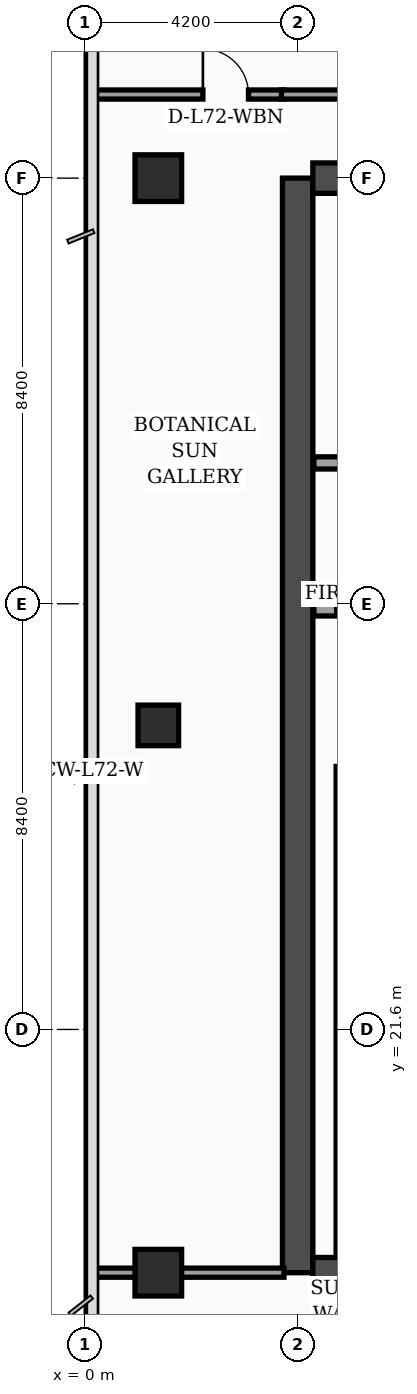
"""IFC4 building model, lengths in metres.
Left out: names, types, materials, properties, quantities, classifications, styles, units other than length and angle.
Written with IfcOpenShell. Run it as: python <this file> out.ifc"""

import sys

from ifc_helpers import new_model, si_unit, direction, frame, frame_2d, origin, origin_2d, place, context, subcontext, project, spatial, rectangle, extrude, element, fill, save


model = new_model("IFC4")
c1 = context("Model", 3, precision=1e-05, world=origin(), true_north=direction((0.0, 1.0)))
c2 = subcontext(c1, "Body", "Model", "MODEL_VIEW")
j1 = project(units=[si_unit("LENGTHUNIT", "METRE"), si_unit("PLANEANGLEUNIT", "RADIAN")], contexts=[c1])
p1 = place(None, origin())
s1 = spatial("IfcSite", under=j1, at=p1, CompositionType="ELEMENT")
p2 = place(p1, origin())
s2 = spatial("IfcBuilding", under=s1, at=p2, CompositionType="ELEMENT")
p3 = place(p2, frame((0.0, 0.0, 291.1)))
s3 = spatial("IfcBuildingStorey", under=s2, at=p3, CompositionType="ELEMENT", Elevation=291.1)
p4 = place(p3, frame((4.2, 16.8, 0.0), z_axis=(0.0, 0.0, 1.0), x_axis=(0.0, 1.0, 0.0)))
e1 = element("IfcWall", 1, at=p4, inside=s3, PredefinedType="SHEAR", context=c2, shape_type="SweptSolid", body=[
    extrude(rectangle(XDim=21.6, YDim=0.6, at=frame_2d((10.8, 0.0))), origin(), (0.0, 0.0, 1.0), 3.56),
])
p5 = place(p3, frame((4.5, 38.4, 0.0), z_axis=(0.0, 0.0, 1.0), x_axis=(1.0, 0.0, 0.0)))
e2 = element("IfcWall", 2, at=p5, inside=s3, PredefinedType="SHEAR", context=c2, shape_type="SweptSolid", body=[
    extrude(rectangle(XDim=10.2, YDim=0.6, at=frame_2d((5.1, 0.0))), origin(), (0.0, 0.0, 1.0), 3.56),
])
p6 = place(p5, frame((5.8, 0.0, 0.0)))
e3 = element("IfcOpeningElement", 3, at=p6, cuts=e2, PredefinedType="OPENING", context=c2, shape_type="SweptSolid", body=[
    extrude(rectangle(XDim=1.1, YDim=2.2, at=frame_2d((0.55, 1.1))), frame((0.0, 0.31, 0.0), z_axis=(0.0, -1.0, 0.0), x_axis=(1.0, 0.0, 0.0)), (0.0, 0.0, 1.0), 0.62),
])
p7 = place(p3, frame((4.5, 16.8, 0.0), z_axis=(0.0, 0.0, 1.0), x_axis=(1.0, 0.0, 0.0)))
e4 = element("IfcWall", 4, at=p7, inside=s3, PredefinedType="SHEAR", context=c2, shape_type="SweptSolid", body=[
    extrude(rectangle(XDim=10.2, YDim=0.6, at=frame_2d((5.1, 0.0))), origin(), (0.0, 0.0, 1.0), 3.56),
])
p8 = place(p3, frame((5.08, 17.1, 0.0), z_axis=(0.0, 0.0, 1.0), x_axis=(0.0, 1.0, 0.0)))
e5 = element("IfcWall", 5, at=p8, inside=s3, PredefinedType="SOLIDWALL", context=c2, shape_type="SweptSolid", body=[
    extrude(rectangle(XDim=9.69, YDim=0.24, at=frame_2d((4.845, 0.0))), origin(), (0.0, 0.0, 1.0), 3.56),
])
p9 = place(p3, frame((1.45, 16.8, 0.0), z_axis=(0.0, 0.0, 1.0), x_axis=(1.0, 0.0, 0.0)))
e6 = element("IfcColumn", 6, at=p9, inside=s3, PredefinedType="COLUMN", context=c2, shape_type="SweptSolid", body=[
    extrude(rectangle(XDim=0.92, YDim=0.92, at=origin_2d()), origin(), (0.0, 0.0, 1.0), 3.56),
])
p10 = place(p3, frame((1.45, 27.6, 0.0), z_axis=(0.0, 0.0, 1.0), x_axis=(1.0, 0.0, 0.0)))
e7 = element("IfcColumn", 7, at=p10, inside=s3, PredefinedType="COLUMN", context=c2, shape_type="SweptSolid", body=[
    extrude(rectangle(XDim=0.8, YDim=0.8, at=origin_2d()), origin(), (0.0, 0.0, 1.0), 3.56),
])
p11 = place(p3, frame((1.45, 38.4, 0.0), z_axis=(0.0, 0.0, 1.0), x_axis=(1.0, 0.0, 0.0)))
e8 = element("IfcColumn", 8, at=p11, inside=s3, PredefinedType="COLUMN", context=c2, shape_type="SweptSolid", body=[
    extrude(rectangle(XDim=0.92, YDim=0.92, at=origin_2d()), origin(), (0.0, 0.0, 1.0), 3.56),
])
p12 = place(p3, frame((4.52, 29.88, 0.0), z_axis=(0.0, 0.0, 1.0), x_axis=(1.0, 0.0, 0.0)))
e9 = element("IfcWall", 9, at=p12, inside=s3, PredefinedType="SOLIDWALL", context=c2, shape_type="SweptSolid", body=[
    extrude(rectangle(XDim=4.9, YDim=0.24, at=frame_2d((2.45, 0.0))), origin(), (0.0, 0.0, 1.0), 3.56),
])
p13 = place(p12, frame((0.45, 0.0, 0.0)))
e10 = element("IfcOpeningElement", 10, at=p13, cuts=e9, PredefinedType="OPENING", context=c2, shape_type="SweptSolid", body=[
    extrude(rectangle(XDim=1.3, YDim=2.35, at=frame_2d((0.65, 1.175))), frame((0.0, 0.13, 0.0), z_axis=(0.0, -1.0, 0.0), x_axis=(1.0, 0.0, 0.0)), (0.0, 0.0, 1.0), 0.26),
])
p14 = place(p3, frame((4.52, 32.78, 0.0), z_axis=(0.0, 0.0, 1.0), x_axis=(1.0, 0.0, 0.0)))
e11 = element("IfcWall", 11, at=p14, inside=s3, PredefinedType="SOLIDWALL", context=c2, shape_type="SweptSolid", body=[
    extrude(rectangle(XDim=4.9, YDim=0.24, at=frame_2d((2.45, 0.0))), origin(), (0.0, 0.0, 1.0), 3.19),
])
p15 = place(p3, frame((0.08, 16.8, 0.0), z_axis=(0.0, 0.0, 1.0), x_axis=(1.0, 0.0, 0.0)))
e12 = element("IfcWall", 12, at=p15, inside=s3, PredefinedType="PARTITIONING", context=c2, shape_type="SweptSolid", body=[
    extrude(rectangle(XDim=3.85, YDim=0.18, at=frame_2d((1.925, 0.0))), origin(), (0.0, 0.0, 1.0), 2.99),
])
p16 = place(p3, frame((0.08, 40.05, 0.0), z_axis=(0.0, 0.0, 1.0), x_axis=(1.0, 0.0, 0.0)))
e13 = element("IfcWall", 13, at=p16, inside=s3, PredefinedType="PARTITIONING", context=c2, shape_type="SweptSolid", body=[
    extrude(rectangle(XDim=3.85, YDim=0.18, at=frame_2d((1.925, 0.0))), origin(), (0.0, 0.0, 1.0), 2.99),
])
p17 = place(p16, frame((2.25, 0.0, 0.0)))
e14 = element("IfcOpeningElement", 14, at=p17, cuts=e13, PredefinedType="OPENING", context=c2, shape_type="SweptSolid", body=[
    extrude(rectangle(XDim=0.9, YDim=2.15, at=frame_2d((0.45, 1.075))), frame((0.0, 0.1, 0.0), z_axis=(0.0, -1.0, 0.0), x_axis=(1.0, 0.0, 0.0)), (0.0, 0.0, 1.0), 0.2),
])
p18 = place(p3, frame((3.88, 40.05, 0.0), z_axis=(0.0, 0.0, 1.0), x_axis=(1.0, 0.0, 0.0)))
e15 = element("IfcWall", 15, at=p18, inside=s3, PredefinedType="PARTITIONING", context=c2, shape_type="SweptSolid", body=[
    extrude(rectangle(XDim=11.27, YDim=0.18, at=frame_2d((5.635, 0.0))), origin(), (0.0, 0.0, 1.0), 2.99),
])
p19 = place(p13, origin())
e16 = element("IfcDoor", 16, at=p19, inside=s3, OperationType="DOUBLE_DOOR_SLIDING", PredefinedType="DOOR", context=c2, shape_type="SweptSolid", body=[
    extrude(rectangle(XDim=1.3, YDim=2.35, at=frame_2d((0.65, 1.175))), frame((0.0, 0.025, 0.0), z_axis=(0.0, -1.0, 0.0), x_axis=(1.0, 0.0, 0.0)), (0.0, 0.0, 1.0), 0.05),
])
fill(e10, e16)
p20 = place(p17, origin())
e17 = element("IfcDoor", 17, at=p20, inside=s3, OperationType="SINGLE_SWING_LEFT", PredefinedType="DOOR", context=c2, shape_type="SweptSolid", body=[
    extrude(rectangle(XDim=0.9, YDim=2.15, at=frame_2d((0.45, 1.075))), frame((0.0, 0.025, 0.0), z_axis=(0.0, -1.0, 0.0), x_axis=(1.0, 0.0, 0.0)), (0.0, 0.0, 1.0), 0.05),
])
fill(e14, e17)
save(model, sys.argv[1])
